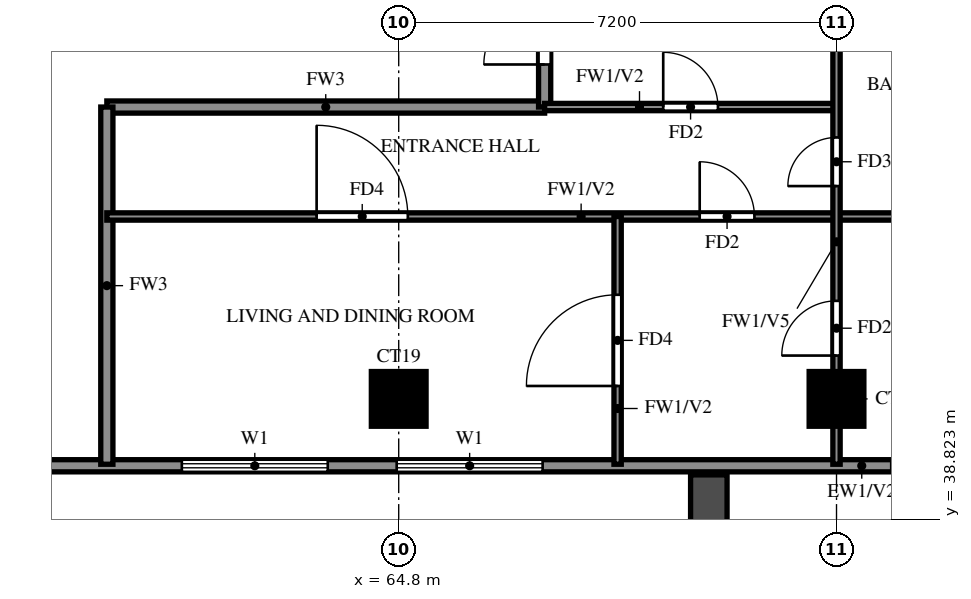
"""IFC4 building model, lengths in metres.
Left out: names, types, materials, properties, quantities, classifications, styles, units other than length and angle.
Written with IfcOpenShell. Run it as: python <this file> out.ifc"""

import sys

from ifc_helpers import new_model, si_unit, direction, frame, frame_2d, origin, origin_2d, place, context, subcontext, project, spatial, rectangle, extrude, source, transform, mapped, element, fill, save


model = new_model("IFC4")
c1 = context("Model", 3, precision=1e-05, world=origin(), true_north=direction((0.0, 1.0)))
c2 = subcontext(c1, "Body", "Model", "MODEL_VIEW")
j1 = project(units=[si_unit("LENGTHUNIT", "METRE"), si_unit("PLANEANGLEUNIT", "RADIAN")], contexts=[c1])
p1 = place(None, origin())
s1 = spatial("IfcSite", under=j1, at=p1, CompositionType="ELEMENT")
p2 = place(p1, origin())
s2 = spatial("IfcBuilding", under=s1, at=p2, CompositionType="ELEMENT")
p3 = place(p2, frame((0.0, 0.0, 181.5)))
s3 = spatial("IfcBuildingStorey", under=s2, at=p3, CompositionType="ELEMENT", Elevation=181.5)
m1 = source(origin(), c2, "Body", "SweptSolid", [
    extrude(rectangle(XDim=0.9, YDim=0.9, at=origin_2d()), origin(), (0.0, 0.0, 1.0), 3.2),
])
for number, where, z_axis, x_axis in (
    (1, (64.8, 40.8, 0.0), (0.0, 0.0, 1.0), (1.0, 0.0, 0.0)),
    (2, (72.0, 40.8, 0.0), (0.0, 0.0, 1.0), (1.0, 0.0, 0.0)),
):
    element("IfcColumn", number, at=place(p3, frame(where, z_axis=z_axis, x_axis=x_axis)), inside=s3, PredefinedType="COLUMN", context=c2, shape_type="MappedRepresentation", body=[
        mapped(m1, transform((0.0, 0.0, 0.0))),
    ])
p4 = place(p3, frame((85.719, 39.881, 0.0), z_axis=(0.0, 0.0, 1.0), x_axis=(-0.86377618652, 0.503875678716, 0.0)))
e3 = element("IfcWall", 3, at=p4, inside=s3, PredefinedType="SOLIDWALL", context=c2, shape_type="SweptSolid", body=[
    extrude(rectangle(XDim=16.311, YDim=0.2, at=frame_2d((8.156, 0.0))), origin(), (0.0, 0.0, 1.0), 3.2),
])
p5 = place(p4, frame((13.326, 0.0, 1.5)))
e4 = element("IfcOpeningElement", 4, at=p5, cuts=e3, PredefinedType="OPENING", context=c2, shape_type="SweptSolid", body=[
    extrude(rectangle(XDim=0.9, YDim=0.9, at=frame_2d((0.45, 0.45))), frame((0.0, 0.11, 0.0), z_axis=(0.0, -1.0, 0.0), x_axis=(1.0, 0.0, 0.0)), (0.0, 0.0, 1.0), 0.22),
])
p6 = place(p3, frame((58.8, 39.7, 0.0), z_axis=(0.0, 0.0, 1.0), x_axis=(1.0, 0.0, 0.0)))
e5 = element("IfcWall", 5, at=p6, inside=s3, PredefinedType="SOLIDWALL", context=c2, shape_type="SweptSolid", body=[
    extrude(rectangle(XDim=27.23, YDim=0.2, at=frame_2d((13.615, 0.0))), origin(), (0.0, 0.0, 1.0), 3.2),
])
p7 = place(p6, frame((14.1, 0.0, 0.0)))
e6 = element("IfcOpeningElement", 6, at=p7, cuts=e5, PredefinedType="OPENING", context=c2, shape_type="SweptSolid", body=[
    extrude(rectangle(XDim=1.8, YDim=2.4, at=frame_2d((0.9, 1.2))), frame((0.0, 0.11, 0.0), z_axis=(0.0, -1.0, 0.0), x_axis=(1.0, 0.0, 0.0)), (0.0, 0.0, 1.0), 0.22),
])
p8 = place(p6, frame((2.433, 0.0, 0.6)))
e7 = element("IfcOpeningElement", 7, at=p8, cuts=e5, PredefinedType="OPENING", context=c2, shape_type="SweptSolid", body=[
    extrude(rectangle(XDim=2.4, YDim=2.4, at=frame_2d((1.2, 1.2))), frame((0.0, 0.11, 0.0), z_axis=(0.0, -1.0, 0.0), x_axis=(1.0, 0.0, 0.0)), (0.0, 0.0, 1.0), 0.22),
])
p9 = place(p6, frame((5.967, 0.0, 0.6)))
e8 = element("IfcOpeningElement", 8, at=p9, cuts=e5, PredefinedType="OPENING", context=c2, shape_type="SweptSolid", body=[
    extrude(rectangle(XDim=2.4, YDim=2.4, at=frame_2d((1.2, 1.2))), frame((0.0, 0.11, 0.0), z_axis=(0.0, -1.0, 0.0), x_axis=(1.0, 0.0, 0.0)), (0.0, 0.0, 1.0), 0.22),
])
p10 = place(p6, frame((16.35, 0.0, 0.6)))
e9 = element("IfcOpeningElement", 9, at=p10, cuts=e5, PredefinedType="OPENING", context=c2, shape_type="SweptSolid", body=[
    extrude(rectangle(XDim=0.9, YDim=2.4, at=frame_2d((0.45, 1.2))), frame((0.0, 0.11, 0.0), z_axis=(0.0, -1.0, 0.0), x_axis=(1.0, 0.0, 0.0)), (0.0, 0.0, 1.0), 0.22),
])
p11 = place(p6, frame((18.809, 0.0, 0.6)))
e10 = element("IfcOpeningElement", 10, at=p11, cuts=e5, PredefinedType="OPENING", context=c2, shape_type="SweptSolid", body=[
    extrude(rectangle(XDim=2.4, YDim=2.4, at=frame_2d((1.2, 1.2))), frame((0.0, 0.11, 0.0), z_axis=(0.0, -1.0, 0.0), x_axis=(1.0, 0.0, 0.0)), (0.0, 0.0, 1.0), 0.22),
])
p12 = place(p6, frame((21.917, 0.0, 0.6)))
e11 = element("IfcOpeningElement", 11, at=p12, cuts=e5, PredefinedType="OPENING", context=c2, shape_type="SweptSolid", body=[
    extrude(rectangle(XDim=2.4, YDim=2.4, at=frame_2d((1.2, 1.2))), frame((0.0, 0.11, 0.0), z_axis=(0.0, -1.0, 0.0), x_axis=(1.0, 0.0, 0.0)), (0.0, 0.0, 1.0), 0.22),
])
p13 = place(p6, frame((25.978, 0.0, 0.6)))
e12 = element("IfcOpeningElement", 12, at=p13, cuts=e5, PredefinedType="OPENING", context=c2, shape_type="SweptSolid", body=[
    extrude(rectangle(XDim=0.9, YDim=2.4, at=frame_2d((0.45, 1.2))), frame((0.0, 0.11, 0.0), z_axis=(0.0, -1.0, 0.0), x_axis=(1.0, 0.0, 0.0)), (0.0, 0.0, 1.0), 0.22),
])
p14 = place(p3, frame((69.9, 39.55, 0.0), z_axis=(0.0, 0.0, 1.0), x_axis=(0.0, -1.0, 0.0)))
e13 = element("IfcWall", 13, at=p14, inside=s3, PredefinedType="SOLIDWALL", context=c2, shape_type="SweptSolid", body=[
    extrude(rectangle(XDim=2.65, YDim=0.6, at=frame_2d((1.325, 0.0))), origin(), (0.0, 0.0, 1.0), 2.85),
])
p15 = place(p3, frame((60.0, 45.6, 0.0), z_axis=(0.0, 0.0, 1.0), x_axis=(1.0, 0.0, 0.0)))
e14 = element("IfcWall", 14, at=p15, inside=s3, PredefinedType="SOLIDWALL", context=c2, shape_type="SweptSolid", body=[
    extrude(rectangle(XDim=7.2, YDim=0.2, at=frame_2d((3.6, 0.0))), origin(), (0.0, 0.0, 1.0), 3.2),
])
p16 = place(p3, frame((60.0, 39.725, 0.0), z_axis=(0.0, 0.0, 1.0), x_axis=(0.0, 1.0, 0.0)))
e15 = element("IfcWall", 15, at=p16, inside=s3, PredefinedType="SOLIDWALL", context=c2, shape_type="SweptSolid", body=[
    extrude(rectangle(XDim=5.875, YDim=0.2, at=frame_2d((2.938, 0.0))), origin(), (0.0, 0.0, 1.0), 3.2),
])
p17 = place(p3, frame((67.2, 45.6, 0.0), z_axis=(0.0, 0.0, 1.0), x_axis=(0.0, 1.0, 0.0)))
e16 = element("IfcWall", 16, at=p17, inside=s3, PredefinedType="SOLIDWALL", context=c2, shape_type="SweptSolid", body=[
    extrude(rectangle(XDim=8.4, YDim=0.2, at=frame_2d((4.2, 0.0))), origin(), (0.0, 0.0, 1.0), 3.2),
])
p18 = place(p17, frame((6.7, 0.0, 0.0)))
e17 = element("IfcOpeningElement", 17, at=p18, cuts=e16, PredefinedType="OPENING", context=c2, shape_type="SweptSolid", body=[
    extrude(rectangle(XDim=1.0, YDim=2.1, at=frame_2d((0.5, 1.05))), frame((0.0, 0.11, 0.0), z_axis=(0.0, -1.0, 0.0), x_axis=(1.0, 0.0, 0.0)), (0.0, 0.0, 1.0), 0.22),
])
p19 = place(p17, frame((0.7, 0.0, 0.0)))
e18 = element("IfcOpeningElement", 18, at=p19, cuts=e16, PredefinedType="OPENING", context=c2, shape_type="SweptSolid", body=[
    extrude(rectangle(XDim=1.0, YDim=2.1, at=frame_2d((0.5, 1.05))), frame((0.0, 0.11, 0.0), z_axis=(0.0, -1.0, 0.0), x_axis=(1.0, 0.0, 0.0)), (0.0, 0.0, 1.0), 0.22),
])
p20 = place(p3, frame((60.0, 43.8, 0.0), z_axis=(0.0, 0.0, 1.0), x_axis=(1.0, 0.0, 0.0)))
e19 = element("IfcWall", 19, at=p20, inside=s3, PredefinedType="PARTITIONING", context=c2, shape_type="SweptSolid", body=[
    extrude(rectangle(XDim=15.6, YDim=0.12, at=frame_2d((7.8, 0.0))), origin(), (0.0, 0.0, 1.0), 3.2),
])
p21 = place(p20, frame((9.75, 0.0, 0.0)))
e20 = element("IfcOpeningElement", 20, at=p21, cuts=e19, PredefinedType="OPENING", context=c2, shape_type="SweptSolid", body=[
    extrude(rectangle(XDim=0.9, YDim=2.1, at=frame_2d((0.45, 1.05))), frame((0.0, 0.07, 0.0), z_axis=(0.0, -1.0, 0.0), x_axis=(1.0, 0.0, 0.0)), (0.0, 0.0, 1.0), 0.14),
])
p22 = place(p20, frame((3.45, 0.0, 0.0)))
e21 = element("IfcOpeningElement", 21, at=p22, cuts=e19, PredefinedType="OPENING", context=c2, shape_type="SweptSolid", body=[
    extrude(rectangle(XDim=1.5, YDim=2.1, at=frame_2d((0.75, 1.05))), frame((0.0, 0.07, 0.0), z_axis=(0.0, -1.0, 0.0), x_axis=(1.0, 0.0, 0.0)), (0.0, 0.0, 1.0), 0.14),
])
p23 = place(p20, frame((13.4, 0.0, 0.0)))
e22 = element("IfcOpeningElement", 22, at=p23, cuts=e19, PredefinedType="OPENING", context=c2, shape_type="SweptSolid", body=[
    extrude(rectangle(XDim=0.8, YDim=2.1, at=frame_2d((0.4, 1.05))), frame((0.0, 0.07, 0.0), z_axis=(0.0, -1.0, 0.0), x_axis=(1.0, 0.0, 0.0)), (0.0, 0.0, 1.0), 0.14),
])
p24 = place(p3, frame((67.2, 45.6, 0.0), z_axis=(0.0, 0.0, 1.0), x_axis=(1.0, 0.0, 0.0)))
e23 = element("IfcWall", 23, at=p24, inside=s3, PredefinedType="PARTITIONING", context=c2, shape_type="SweptSolid", body=[
    extrude(rectangle(XDim=4.8, YDim=0.12, at=frame_2d((2.4, 0.0))), origin(), (0.0, 0.0, 1.0), 3.2),
])
p25 = place(p24, frame((1.95, 0.0, 0.0)))
e24 = element("IfcOpeningElement", 24, at=p25, cuts=e23, PredefinedType="OPENING", context=c2, shape_type="SweptSolid", body=[
    extrude(rectangle(XDim=0.9, YDim=2.1, at=frame_2d((0.45, 1.05))), frame((0.0, 0.07, 0.0), z_axis=(0.0, -1.0, 0.0), x_axis=(1.0, 0.0, 0.0)), (0.0, 0.0, 1.0), 0.14),
])
p26 = place(p3, frame((68.4, 39.725, 0.0), z_axis=(0.0, 0.0, 1.0), x_axis=(0.0, 1.0, 0.0)))
e25 = element("IfcWall", 25, at=p26, inside=s3, PredefinedType="PARTITIONING", context=c2, shape_type="SweptSolid", body=[
    extrude(rectangle(XDim=4.075, YDim=0.12, at=frame_2d((2.038, 0.0))), origin(), (0.0, 0.0, 1.0), 3.2),
])
p27 = place(p26, frame((1.288, 0.0, 0.0)))
e26 = element("IfcOpeningElement", 26, at=p27, cuts=e25, PredefinedType="OPENING", context=c2, shape_type="SweptSolid", body=[
    extrude(rectangle(XDim=1.5, YDim=2.1, at=frame_2d((0.75, 1.05))), frame((0.0, 0.07, 0.0), z_axis=(0.0, -1.0, 0.0), x_axis=(1.0, 0.0, 0.0)), (0.0, 0.0, 1.0), 0.14),
])
p28 = place(p3, frame((72.0, 39.725, 0.0), z_axis=(0.0, 0.0, 1.0), x_axis=(0.0, 1.0, 0.0)))
e27 = element("IfcWall", 27, at=p28, inside=s3, PredefinedType="PARTITIONING", context=c2, shape_type="SweptSolid", body=[
    extrude(rectangle(XDim=8.13, YDim=0.12, at=frame_2d((4.065, 0.0))), origin(), (0.0, 0.0, 1.0), 2.3),
])
p29 = place(p28, frame((1.788, 0.0, 0.0)))
e28 = element("IfcOpeningElement", 28, at=p29, cuts=e27, PredefinedType="OPENING", context=c2, shape_type="SweptSolid", body=[
    extrude(rectangle(XDim=0.9, YDim=2.1, at=frame_2d((0.45, 1.05))), frame((0.0, 0.07, 0.0), z_axis=(0.0, -1.0, 0.0), x_axis=(1.0, 0.0, 0.0)), (0.0, 0.0, 1.0), 0.14),
])
p30 = place(p28, frame((4.575, 0.0, 0.0)))
e29 = element("IfcOpeningElement", 29, at=p30, cuts=e27, PredefinedType="OPENING", context=c2, shape_type="SweptSolid", body=[
    extrude(rectangle(XDim=0.8, YDim=2.1, at=frame_2d((0.4, 1.05))), frame((0.0, 0.07, 0.0), z_axis=(0.0, -1.0, 0.0), x_axis=(1.0, 0.0, 0.0)), (0.0, 0.0, 1.0), 0.14),
])
p31 = place(p8, origin())
e30 = element("IfcWindow", 30, at=p31, inside=s3, PartitioningType="DOUBLE_PANEL_VERTICAL", PredefinedType="WINDOW", context=c2, shape_type="SweptSolid", body=[
    extrude(rectangle(XDim=2.4, YDim=2.4, at=frame_2d((1.2, 1.2))), frame((0.0, 0.03, 0.0), z_axis=(0.0, -1.0, 0.0), x_axis=(1.0, 0.0, 0.0)), (0.0, 0.0, 1.0), 0.06),
])
fill(e7, e30)
p32 = place(p9, origin())
e31 = element("IfcWindow", 31, at=p32, inside=s3, PartitioningType="DOUBLE_PANEL_VERTICAL", PredefinedType="WINDOW", context=c2, shape_type="SweptSolid", body=[
    extrude(rectangle(XDim=2.4, YDim=2.4, at=frame_2d((1.2, 1.2))), frame((0.0, 0.03, 0.0), z_axis=(0.0, -1.0, 0.0), x_axis=(1.0, 0.0, 0.0)), (0.0, 0.0, 1.0), 0.06),
])
fill(e8, e31)
p33 = place(p27, origin())
e32 = element("IfcDoor", 32, at=p33, inside=s3, OperationType="SINGLE_SWING_LEFT", PredefinedType="DOOR", context=c2, shape_type="SweptSolid", body=[
    extrude(rectangle(XDim=1.5, YDim=2.1, at=frame_2d((0.75, 1.05))), frame((0.0, 0.025, 0.0), z_axis=(0.0, -1.0, 0.0), x_axis=(1.0, 0.0, 0.0)), (0.0, 0.0, 1.0), 0.05),
])
fill(e26, e32)
p34 = place(p25, origin())
e33 = element("IfcDoor", 33, at=p34, inside=s3, OperationType="SINGLE_SWING_RIGHT", PredefinedType="DOOR", context=c2, shape_type="SweptSolid", body=[
    extrude(rectangle(XDim=0.9, YDim=2.1, at=frame_2d((0.45, 1.05))), frame((0.0, 0.025, 0.0), z_axis=(0.0, -1.0, 0.0), x_axis=(1.0, 0.0, 0.0)), (0.0, 0.0, 1.0), 0.05),
])
fill(e24, e33)
p35 = place(p19, origin())
e34 = element("IfcDoor", 34, at=p35, inside=s3, OperationType="SINGLE_SWING_LEFT", PredefinedType="DOOR", context=c2, shape_type="SweptSolid", body=[
    extrude(rectangle(XDim=1.0, YDim=2.1, at=frame_2d((0.5, 1.05))), frame((0.0, 0.025, 0.0), z_axis=(0.0, -1.0, 0.0), x_axis=(1.0, 0.0, 0.0)), (0.0, 0.0, 1.0), 0.05),
])
fill(e18, e34)
p36 = place(p21, origin())
e35 = element("IfcDoor", 35, at=p36, inside=s3, OperationType="SINGLE_SWING_LEFT", PredefinedType="DOOR", context=c2, shape_type="SweptSolid", body=[
    extrude(rectangle(XDim=0.9, YDim=2.1, at=frame_2d((0.45, 1.05))), frame((0.0, 0.025, 0.0), z_axis=(0.0, -1.0, 0.0), x_axis=(1.0, 0.0, 0.0)), (0.0, 0.0, 1.0), 0.05),
])
fill(e20, e35)
p37 = place(p22, origin())
e36 = element("IfcDoor", 36, at=p37, inside=s3, OperationType="SINGLE_SWING_RIGHT", PredefinedType="DOOR", context=c2, shape_type="SweptSolid", body=[
    extrude(rectangle(XDim=1.5, YDim=2.1, at=frame_2d((0.75, 1.05))), frame((0.0, 0.025, 0.0), z_axis=(0.0, -1.0, 0.0), x_axis=(1.0, 0.0, 0.0)), (0.0, 0.0, 1.0), 0.05),
])
fill(e21, e36)
p38 = place(p29, origin())
e37 = element("IfcDoor", 37, at=p38, inside=s3, OperationType="SINGLE_SWING_RIGHT", PredefinedType="DOOR", context=c2, shape_type="SweptSolid", body=[
    extrude(rectangle(XDim=0.9, YDim=2.1, at=frame_2d((0.45, 1.05))), frame((0.0, 0.025, 0.0), z_axis=(0.0, -1.0, 0.0), x_axis=(1.0, 0.0, 0.0)), (0.0, 0.0, 1.0), 0.05),
])
fill(e28, e37)
p39 = place(p30, origin())
e38 = element("IfcDoor", 38, at=p39, inside=s3, OperationType="SINGLE_SWING_LEFT", PredefinedType="DOOR", context=c2, shape_type="SweptSolid", body=[
    extrude(rectangle(XDim=0.8, YDim=2.1, at=frame_2d((0.4, 1.05))), frame((0.0, 0.025, 0.0), z_axis=(0.0, -1.0, 0.0), x_axis=(1.0, 0.0, 0.0)), (0.0, 0.0, 1.0), 0.05),
])
fill(e29, e38)
save(model, sys.argv[1])
